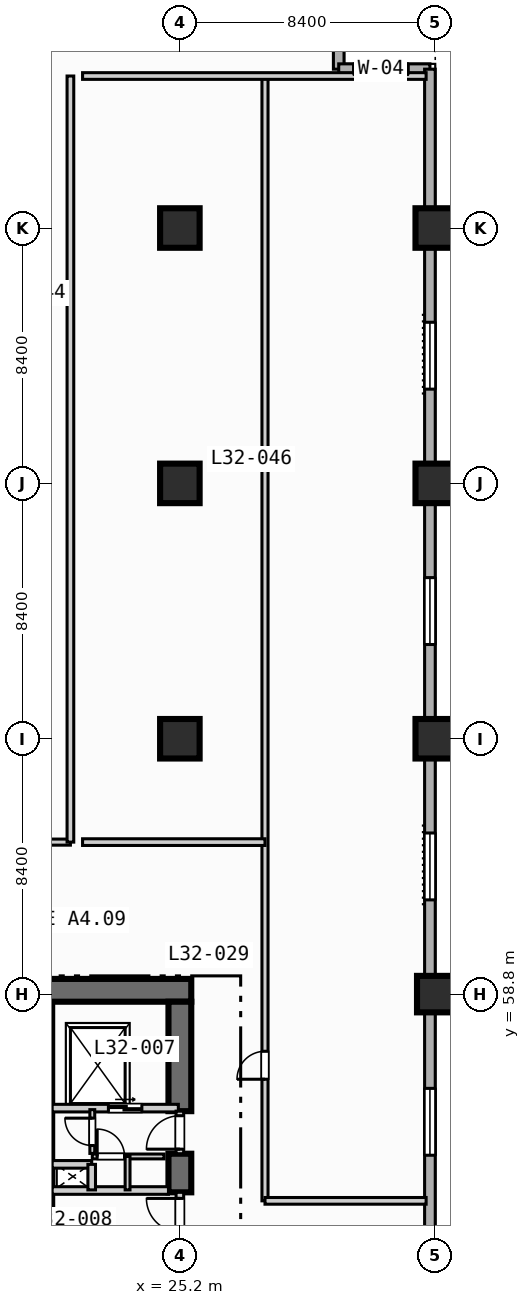
"""IFC4 building model, lengths in metres.
Left out: names, types, materials, properties, quantities, classifications, styles, units other than length and angle.
Written with IfcOpenShell. Run it as: python <this file> out.ifc"""

import sys

from ifc_helpers import new_model, si_unit, direction, frame, frame_2d, origin, origin_2d, place, context, subcontext, project, spatial, rectangle, extrude, element, fill, save


model = new_model("IFC4")
c1 = context("Model", 3, precision=1e-05, world=origin(), true_north=direction((0.0, 1.0)))
c2 = subcontext(c1, "Body", "Model", "MODEL_VIEW")
j1 = project(units=[si_unit("LENGTHUNIT", "METRE"), si_unit("PLANEANGLEUNIT", "RADIAN")], contexts=[c1])
p1 = place(None, origin())
s1 = spatial("IfcSite", under=j1, at=p1, CompositionType="ELEMENT")
p2 = place(p1, origin())
s2 = spatial("IfcBuilding", under=s1, at=p2, CompositionType="ELEMENT")
p3 = place(p2, frame((0.0, 0.0, 134.2)))
s3 = spatial("IfcBuildingStorey", under=s2, at=p3, CompositionType="ELEMENT", Elevation=134.2)
p4 = place(p3, frame((20.5, 58.925, 0.0), z_axis=(0.0, 0.0, 1.0), x_axis=(1.0, 0.0, 0.0)))
e1 = element("IfcWall", 1, at=p4, inside=s3, PredefinedType="SHEAR", context=c2, shape_type="SweptSolid", body=[
    extrude(rectangle(XDim=5.075, YDim=0.75, at=frame_2d((2.538, 0.0))), origin(), (0.0, 0.0, 1.0), 3.55),
])
p5 = place(p3, frame((25.2, 52.28, 0.0), z_axis=(0.0, 0.0, 1.0), x_axis=(0.0, 1.0, 0.0)))
e2 = element("IfcWall", 2, at=p5, inside=s3, PredefinedType="SHEAR", context=c2, shape_type="SweptSolid", body=[
    extrude(rectangle(XDim=1.27, YDim=0.75, at=frame_2d((0.635, 0.0))), origin(), (0.0, 0.0, 1.0), 3.55),
])
p6 = place(p3, frame((25.2, 54.95, 0.0), z_axis=(0.0, 0.0, 1.0), x_axis=(0.0, 1.0, 0.0)))
e3 = element("IfcWall", 3, at=p6, inside=s3, PredefinedType="SHEAR", context=c2, shape_type="SweptSolid", body=[
    extrude(rectangle(XDim=3.6, YDim=0.75, at=frame_2d((1.8, 0.0))), origin(), (0.0, 0.0, 1.0), 3.55),
])
for number, where, z_axis, x_axis in (
    (4, (25.2, 67.2, 0.0), (0.0, 0.0, 1.0), (1.0, 0.0, 0.0)),
    (5, (25.2, 75.6, 0.0), (0.0, 0.0, 1.0), (1.0, 0.0, 0.0)),
    (6, (25.2, 84.0, 0.0), (0.0, 0.0, 1.0), (1.0, 0.0, 0.0)),
):
    element("IfcColumn", number, at=place(p3, frame(where, z_axis=z_axis, x_axis=x_axis)), inside=s3, PredefinedType="COLUMN", context=c2, shape_type="SweptSolid", body=[
        extrude(rectangle(XDim=1.3, YDim=1.3, at=origin_2d()), origin(), (0.0, 0.0, 1.0), 3.8),
    ])
p7 = place(p3, frame((33.6, 58.8, 0.0), z_axis=(0.0, 0.0, 1.0), x_axis=(1.0, 0.0, 0.0)))
e7 = element("IfcColumn", 7, at=p7, inside=s3, PredefinedType="COLUMN", context=c2, shape_type="SweptSolid", body=[
    extrude(rectangle(XDim=1.2, YDim=1.2, at=origin_2d()), origin(), (0.0, 0.0, 1.0), 3.8),
])
for number, where, z_axis, x_axis in (
    (8, (33.6, 67.2, 0.0), (0.0, 0.0, 1.0), (1.0, 0.0, 0.0)),
    (9, (33.6, 75.6, 0.0), (0.0, 0.0, 1.0), (1.0, 0.0, 0.0)),
    (10, (33.6, 84.0, 0.0), (0.0, 0.0, 1.0), (1.0, 0.0, 0.0)),
):
    element("IfcColumn", number, at=place(p3, frame(where, z_axis=z_axis, x_axis=x_axis)), inside=s3, PredefinedType="COLUMN", context=c2, shape_type="SweptSolid", body=[
        extrude(rectangle(XDim=1.3, YDim=1.3, at=origin_2d()), origin(), (0.0, 0.0, 1.0), 3.8),
    ])
p8 = place(p3, frame((30.425, 92.225, 0.0), z_axis=(0.0, 0.0, 1.0), x_axis=(0.0, -1.0, 0.0)))
e11 = element("IfcWall", 11, at=p8, inside=s3, PredefinedType="STANDARD", context=c2, shape_type="SweptSolid", body=[
    extrude(rectangle(XDim=3.0, YDim=0.35, at=frame_2d((1.5, 0.0))), origin(), (0.0, 0.0, 1.0), 3.55),
])
p9 = place(p3, frame((30.425, 89.225, 0.0), z_axis=(0.0, 0.0, 1.0), x_axis=(1.0, 0.0, 0.0)))
e12 = element("IfcWall", 12, at=p9, inside=s3, PredefinedType="STANDARD", context=c2, shape_type="SweptSolid", body=[
    extrude(rectangle(XDim=3.0, YDim=0.35, at=frame_2d((1.5, 0.0))), origin(), (0.0, 0.0, 1.0), 3.55),
])
p10 = place(p9, frame((0.488, 0.0, 0.85)))
e13 = element("IfcOpeningElement", 13, at=p10, cuts=e12, PredefinedType="OPENING", context=c2, shape_type="SweptSolid", body=[
    extrude(rectangle(XDim=1.8, YDim=1.8, at=frame_2d((0.9, 0.9))), frame((0.0, 0.185, 0.0), z_axis=(0.0, -1.0, 0.0), x_axis=(1.0, 0.0, 0.0)), (0.0, 0.0, 1.0), 0.37),
])
p11 = place(p3, frame((33.425, 89.225, 0.0), z_axis=(0.0, 0.0, 1.0), x_axis=(0.0, -1.0, 0.0)))
e14 = element("IfcWall", 14, at=p11, inside=s3, PredefinedType="STANDARD", context=c2, shape_type="SweptSolid", body=[
    extrude(rectangle(XDim=55.8, YDim=0.35, at=frame_2d((27.9, 0.0))), origin(), (0.0, 0.0, 1.0), 3.55),
])
p12 = place(p11, frame((50.325, 0.0, 0.85)))
e15 = element("IfcOpeningElement", 15, at=p12, cuts=e14, PredefinedType="OPENING", context=c2, shape_type="SweptSolid", body=[
    extrude(rectangle(XDim=2.2, YDim=1.8, at=frame_2d((1.1, 0.9))), frame((0.0, 0.185, 0.0), z_axis=(0.0, -1.0, 0.0), x_axis=(1.0, 0.0, 0.0)), (0.0, 0.0, 1.0), 0.37),
])
p13 = place(p11, frame((33.525, 0.0, 0.85)))
e16 = element("IfcOpeningElement", 16, at=p13, cuts=e14, PredefinedType="OPENING", context=c2, shape_type="SweptSolid", body=[
    extrude(rectangle(XDim=2.2, YDim=1.8, at=frame_2d((1.1, 0.9))), frame((0.0, 0.185, 0.0), z_axis=(0.0, -1.0, 0.0), x_axis=(1.0, 0.0, 0.0)), (0.0, 0.0, 1.0), 0.37),
])
p14 = place(p11, frame((25.125, 0.0, 0.85)))
e17 = element("IfcOpeningElement", 17, at=p14, cuts=e14, PredefinedType="OPENING", context=c2, shape_type="SweptSolid", body=[
    extrude(rectangle(XDim=2.2, YDim=1.8, at=frame_2d((1.1, 0.9))), frame((0.0, 0.185, 0.0), z_axis=(0.0, -1.0, 0.0), x_axis=(1.0, 0.0, 0.0)), (0.0, 0.0, 1.0), 0.37),
])
p15 = place(p11, frame((16.725, 0.0, 0.85)))
e18 = element("IfcOpeningElement", 18, at=p15, cuts=e14, PredefinedType="OPENING", context=c2, shape_type="SweptSolid", body=[
    extrude(rectangle(XDim=2.2, YDim=1.8, at=frame_2d((1.1, 0.9))), frame((0.0, 0.185, 0.0), z_axis=(0.0, -1.0, 0.0), x_axis=(1.0, 0.0, 0.0)), (0.0, 0.0, 1.0), 0.37),
])
p16 = place(p11, frame((8.325, 0.0, 0.85)))
e19 = element("IfcOpeningElement", 19, at=p16, cuts=e14, PredefinedType="OPENING", context=c2, shape_type="SweptSolid", body=[
    extrude(rectangle(XDim=2.2, YDim=1.8, at=frame_2d((1.1, 0.9))), frame((0.0, 0.185, 0.0), z_axis=(0.0, -1.0, 0.0), x_axis=(1.0, 0.0, 0.0)), (0.0, 0.0, 1.0), 0.37),
])
p17 = place(p3, frame((25.2, 50.8, 0.0), z_axis=(0.0, 0.0, 1.0), x_axis=(0.0, 1.0, 0.0)))
e20 = element("IfcWall", 20, at=p17, inside=s3, PredefinedType="SOLIDWALL", context=c2, shape_type="SweptSolid", body=[
    extrude(rectangle(XDim=1.48, YDim=0.25, at=frame_2d((0.74, 0.0))), origin(), (0.0, 0.0, 1.0), 3.55),
])
p18 = place(p17, frame((0.18, 0.0, 0.0)))
e21 = element("IfcOpeningElement", 21, at=p18, cuts=e20, PredefinedType="OPENING", context=c2, shape_type="SweptSolid", body=[
    extrude(rectangle(XDim=1.1, YDim=2.15, at=frame_2d((0.55, 1.075))), frame((0.0, 0.135, 0.0), z_axis=(0.0, -1.0, 0.0), x_axis=(1.0, 0.0, 0.0)), (0.0, 0.0, 1.0), 0.27),
])
p19 = place(p3, frame((21.0, 52.34, 0.0), z_axis=(0.0, 0.0, 1.0), x_axis=(1.0, 0.0, 0.0)))
e22 = element("IfcWall", 22, at=p19, inside=s3, PredefinedType="SOLIDWALL", context=c2, shape_type="SweptSolid", body=[
    extrude(rectangle(XDim=3.825, YDim=0.25, at=frame_2d((1.913, 0.0))), origin(), (0.0, 0.0, 1.0), 3.55),
])
p20 = place(p3, frame((21.0, 55.05, 0.0), z_axis=(0.0, 0.0, 1.0), x_axis=(1.0, 0.0, 0.0)))
e23 = element("IfcWall", 23, at=p20, inside=s3, PredefinedType="SOLIDWALL", context=c2, shape_type="SweptSolid", body=[
    extrude(rectangle(XDim=4.15, YDim=0.25, at=frame_2d((2.075, 0.0))), origin(), (0.0, 0.0, 1.0), 3.55),
])
p21 = place(p20, frame((1.85, 0.0, 0.0)))
e24 = element("IfcOpeningElement", 24, at=p21, cuts=e23, PredefinedType="OPENING", context=c2, shape_type="SweptSolid", body=[
    extrude(rectangle(XDim=1.1, YDim=2.15, at=frame_2d((0.55, 1.075))), frame((0.0, 0.135, 0.0), z_axis=(0.0, -1.0, 0.0), x_axis=(1.0, 0.0, 0.0)), (0.0, 0.0, 1.0), 0.27),
])
p22 = place(p3, frame((25.2, 53.55, 0.0), z_axis=(0.0, 0.0, 1.0), x_axis=(0.0, 1.0, 0.0)))
e25 = element("IfcWall", 25, at=p22, inside=s3, PredefinedType="SOLIDWALL", context=c2, shape_type="SweptSolid", body=[
    extrude(rectangle(XDim=1.4, YDim=0.25, at=frame_2d((0.7, 0.0))), origin(), (0.0, 0.0, 1.0), 3.55),
])
p23 = place(p22, frame((0.15, 0.0, 0.0)))
e26 = element("IfcOpeningElement", 26, at=p23, cuts=e25, PredefinedType="OPENING", context=c2, shape_type="SweptSolid", body=[
    extrude(rectangle(XDim=1.1, YDim=2.15, at=frame_2d((0.55, 1.075))), frame((0.0, 0.135, 0.0), z_axis=(0.0, -1.0, 0.0), x_axis=(1.0, 0.0, 0.0)), (0.0, 0.0, 1.0), 0.27),
])
p24 = place(p3, frame((21.0, 53.2, 0.0), z_axis=(0.0, 0.0, 1.0), x_axis=(1.0, 0.0, 0.0)))
e27 = element("IfcWall", 27, at=p24, inside=s3, PredefinedType="SOLIDWALL", context=c2, shape_type="SweptSolid", body=[
    extrude(rectangle(XDim=1.3, YDim=0.25, at=frame_2d((0.65, 0.0))), origin(), (0.0, 0.0, 1.0), 3.55),
])
p25 = place(p3, frame((22.3, 52.36, 0.0), z_axis=(0.0, 0.0, 1.0), x_axis=(0.0, 1.0, 0.0)))
e28 = element("IfcWall", 28, at=p25, inside=s3, PredefinedType="SOLIDWALL", context=c2, shape_type="SweptSolid", body=[
    extrude(rectangle(XDim=0.84, YDim=0.25, at=frame_2d((0.42, 0.0))), origin(), (0.0, 0.0, 1.0), 3.55),
])
p26 = place(p3, frame((22.32, 53.56, 0.0), z_axis=(0.0, 0.0, 1.0), x_axis=(0.0, 1.0, 0.0)))
e29 = element("IfcWall", 29, at=p26, inside=s3, PredefinedType="PARTITIONING", context=c2, shape_type="SweptSolid", body=[
    extrude(rectangle(XDim=1.44, YDim=0.16, at=frame_2d((0.72, 0.0))), origin(), (0.0, 0.0, 1.0), 3.55),
])
p27 = place(p26, frame((0.26, 0.0, 0.0)))
e30 = element("IfcOpeningElement", 30, at=p27, cuts=e29, PredefinedType="OPENING", context=c2, shape_type="SweptSolid", body=[
    extrude(rectangle(XDim=0.9, YDim=2.1, at=frame_2d((0.45, 1.05))), frame((0.0, 0.09, 0.0), z_axis=(0.0, -1.0, 0.0), x_axis=(1.0, 0.0, 0.0)), (0.0, 0.0, 1.0), 0.18),
])
p28 = place(p3, frame((22.32, 53.46, 0.0), z_axis=(0.0, 0.0, 1.0), x_axis=(1.0, 0.0, 0.0)))
e31 = element("IfcWall", 31, at=p28, inside=s3, PredefinedType="PARTITIONING", context=c2, shape_type="SweptSolid", body=[
    extrude(rectangle(XDim=2.36, YDim=0.16, at=frame_2d((1.18, 0.0))), origin(), (0.0, 0.0, 1.0), 3.55),
])
p29 = place(p28, frame((0.16, 0.0, 0.0)))
e32 = element("IfcOpeningElement", 32, at=p29, cuts=e31, PredefinedType="OPENING", context=c2, shape_type="SweptSolid", body=[
    extrude(rectangle(XDim=0.9, YDim=2.1, at=frame_2d((0.45, 1.05))), frame((0.0, 0.09, 0.0), z_axis=(0.0, -1.0, 0.0), x_axis=(1.0, 0.0, 0.0)), (0.0, 0.0, 1.0), 0.18),
])
p30 = place(p3, frame((23.48, 52.36, 0.0), z_axis=(0.0, 0.0, 1.0), x_axis=(0.0, 1.0, 0.0)))
e33 = element("IfcWall", 33, at=p30, inside=s3, PredefinedType="PARTITIONING", context=c2, shape_type="SweptSolid", body=[
    extrude(rectangle(XDim=1.1, YDim=0.16, at=frame_2d((0.55, 0.0))), origin(), (0.0, 0.0, 1.0), 3.55),
])
p31 = place(p3, frame((3.4, 63.8, 0.0), z_axis=(0.0, 0.0, 1.0), x_axis=(1.0, 0.0, 0.0)))
e34 = element("IfcWall", 34, at=p31, inside=s3, PredefinedType="PARTITIONING", context=c2, shape_type="SweptSolid", body=[
    extrude(rectangle(XDim=18.2, YDim=0.2, at=frame_2d((9.1, 0.0))), origin(), (0.0, 0.0, 1.0), 3.55),
])
p32 = place(p31, frame((4.05, 0.0, 0.0)))
e35 = element("IfcOpeningElement", 35, at=p32, cuts=e34, PredefinedType="OPENING", context=c2, shape_type="SweptSolid", body=[
    extrude(rectangle(XDim=1.0, YDim=2.15, at=frame_2d((0.5, 1.075))), frame((0.0, 0.11, 0.0), z_axis=(0.0, -1.0, 0.0), x_axis=(1.0, 0.0, 0.0)), (0.0, 0.0, 1.0), 0.22),
])
p33 = place(p3, frame((21.6, 63.8, 0.0), z_axis=(0.0, 0.0, 1.0), x_axis=(0.0, 1.0, 0.0)))
e36 = element("IfcWall", 36, at=p33, inside=s3, PredefinedType="PARTITIONING", context=c2, shape_type="SweptSolid", body=[
    extrude(rectangle(XDim=25.2, YDim=0.22, at=frame_2d((12.6, 0.0))), origin(), (0.0, 0.0, 1.0), 3.55),
])
p34 = place(p3, frame((28.0, 52.0, 0.0), z_axis=(0.0, 0.0, 1.0), x_axis=(0.0, 1.0, 0.0)))
e37 = element("IfcWall", 37, at=p34, inside=s3, PredefinedType="PARTITIONING", context=c2, shape_type="SweptSolid", body=[
    extrude(rectangle(XDim=37.0, YDim=0.2, at=frame_2d((18.5, 0.0))), origin(), (0.0, 0.0, 1.0), 3.55),
])
p35 = place(p34, frame((4.0, 0.0, 0.0)))
e38 = element("IfcOpeningElement", 38, at=p35, cuts=e37, PredefinedType="OPENING", context=c2, shape_type="SweptSolid", body=[
    extrude(rectangle(XDim=0.92, YDim=2.1, at=frame_2d((0.46, 1.05))), frame((0.0, 0.11, 0.0), z_axis=(0.0, -1.0, 0.0), x_axis=(1.0, 0.0, 0.0)), (0.0, 0.0, 1.0), 0.22),
])
p36 = place(p3, frame((28.0, 52.0, 0.0), z_axis=(0.0, 0.0, 1.0), x_axis=(1.0, 0.0, 0.0)))
e39 = element("IfcWall", 39, at=p36, inside=s3, PredefinedType="PARTITIONING", context=c2, shape_type="SweptSolid", body=[
    extrude(rectangle(XDim=5.3, YDim=0.22, at=frame_2d((2.65, 0.0))), origin(), (0.0, 0.0, 1.0), 3.55),
])
p37 = place(p3, frame((22.0, 89.0, 0.0), z_axis=(0.0, 0.0, 1.0), x_axis=(1.0, 0.0, 0.0)))
e40 = element("IfcWall", 40, at=p37, inside=s3, PredefinedType="PARTITIONING", context=c2, shape_type="SweptSolid", body=[
    extrude(rectangle(XDim=11.3, YDim=0.22, at=frame_2d((5.65, 0.0))), origin(), (0.0, 0.0, 1.0), 3.55),
])
p38 = place(p3, frame((22.0, 63.8, 0.0), z_axis=(0.0, 0.0, 1.0), x_axis=(1.0, 0.0, 0.0)))
e41 = element("IfcWall", 41, at=p38, inside=s3, PredefinedType="PARTITIONING", context=c2, shape_type="SweptSolid", body=[
    extrude(rectangle(XDim=6.0, YDim=0.22, at=frame_2d((3.0, 0.0))), origin(), (0.0, 0.0, 1.0), 3.55),
])
p39 = place(p10, origin())
e42 = element("IfcWindow", 42, at=p39, inside=s3, PartitioningType="SINGLE_PANEL", PredefinedType="WINDOW", context=c2, shape_type="SweptSolid", body=[
    extrude(rectangle(XDim=1.8, YDim=1.8, at=frame_2d((0.9, 0.9))), frame((0.0, 0.03, 0.0), z_axis=(0.0, -1.0, 0.0), x_axis=(1.0, 0.0, 0.0)), (0.0, 0.0, 1.0), 0.06),
])
fill(e13, e42)
p40 = place(p13, origin())
e43 = element("IfcWindow", 43, at=p40, inside=s3, PartitioningType="SINGLE_PANEL", PredefinedType="WINDOW", context=c2, shape_type="SweptSolid", body=[
    extrude(rectangle(XDim=2.2, YDim=1.8, at=frame_2d((1.1, 0.9))), frame((0.0, 0.03, 0.0), z_axis=(0.0, -1.0, 0.0), x_axis=(1.0, 0.0, 0.0)), (0.0, 0.0, 1.0), 0.06),
])
fill(e16, e43)
p41 = place(p14, origin())
e44 = element("IfcWindow", 44, at=p41, inside=s3, PartitioningType="SINGLE_PANEL", PredefinedType="WINDOW", context=c2, shape_type="SweptSolid", body=[
    extrude(rectangle(XDim=2.2, YDim=1.8, at=frame_2d((1.1, 0.9))), frame((0.0, 0.03, 0.0), z_axis=(0.0, -1.0, 0.0), x_axis=(1.0, 0.0, 0.0)), (0.0, 0.0, 1.0), 0.06),
])
fill(e17, e44)
p42 = place(p15, origin())
e45 = element("IfcWindow", 45, at=p42, inside=s3, PartitioningType="SINGLE_PANEL", PredefinedType="WINDOW", context=c2, shape_type="SweptSolid", body=[
    extrude(rectangle(XDim=2.2, YDim=1.8, at=frame_2d((1.1, 0.9))), frame((0.0, 0.03, 0.0), z_axis=(0.0, -1.0, 0.0), x_axis=(1.0, 0.0, 0.0)), (0.0, 0.0, 1.0), 0.06),
])
fill(e18, e45)
p43 = place(p16, origin())
e46 = element("IfcWindow", 46, at=p43, inside=s3, PartitioningType="SINGLE_PANEL", PredefinedType="WINDOW", context=c2, shape_type="SweptSolid", body=[
    extrude(rectangle(XDim=2.2, YDim=1.8, at=frame_2d((1.1, 0.9))), frame((0.0, 0.03, 0.0), z_axis=(0.0, -1.0, 0.0), x_axis=(1.0, 0.0, 0.0)), (0.0, 0.0, 1.0), 0.06),
])
fill(e19, e46)
p44 = place(p18, origin())
e47 = element("IfcDoor", 47, at=p44, inside=s3, OperationType="SINGLE_SWING_RIGHT", PredefinedType="DOOR", context=c2, shape_type="SweptSolid", body=[
    extrude(rectangle(XDim=1.1, YDim=2.15, at=frame_2d((0.55, 1.075))), frame((0.0, 0.025, 0.0), z_axis=(0.0, -1.0, 0.0), x_axis=(1.0, 0.0, 0.0)), (0.0, 0.0, 1.0), 0.05),
])
fill(e21, e47)
p45 = place(p21, origin())
e48 = element("IfcDoor", 48, at=p45, inside=s3, OperationType="SLIDING_TO_LEFT", PredefinedType="DOOR", context=c2, shape_type="SweptSolid", body=[
    extrude(rectangle(XDim=1.1, YDim=2.15, at=frame_2d((0.55, 1.075))), frame((0.0, 0.025, 0.0), z_axis=(0.0, -1.0, 0.0), x_axis=(1.0, 0.0, 0.0)), (0.0, 0.0, 1.0), 0.05),
])
fill(e24, e48)
p46 = place(p23, origin())
e49 = element("IfcDoor", 49, at=p46, inside=s3, OperationType="SINGLE_SWING_LEFT", PredefinedType="DOOR", context=c2, shape_type="SweptSolid", body=[
    extrude(rectangle(XDim=1.1, YDim=2.15, at=frame_2d((0.55, 1.075))), frame((0.0, 0.025, 0.0), z_axis=(0.0, -1.0, 0.0), x_axis=(1.0, 0.0, 0.0)), (0.0, 0.0, 1.0), 0.05),
])
fill(e26, e49)
p47 = place(p27, origin())
e50 = element("IfcDoor", 50, at=p47, inside=s3, OperationType="SINGLE_SWING_RIGHT", PredefinedType="DOOR", context=c2, shape_type="SweptSolid", body=[
    extrude(rectangle(XDim=0.9, YDim=2.1, at=frame_2d((0.45, 1.05))), frame((0.0, 0.025, 0.0), z_axis=(0.0, -1.0, 0.0), x_axis=(1.0, 0.0, 0.0)), (0.0, 0.0, 1.0), 0.05),
])
fill(e30, e50)
p48 = place(p29, origin())
e51 = element("IfcDoor", 51, at=p48, inside=s3, OperationType="SINGLE_SWING_LEFT", PredefinedType="DOOR", context=c2, shape_type="SweptSolid", body=[
    extrude(rectangle(XDim=0.9, YDim=2.1, at=frame_2d((0.45, 1.05))), frame((0.0, 0.025, 0.0), z_axis=(0.0, -1.0, 0.0), x_axis=(1.0, 0.0, 0.0)), (0.0, 0.0, 1.0), 0.05),
])
fill(e32, e51)
p49 = place(p35, origin())
e52 = element("IfcDoor", 52, at=p49, inside=s3, OperationType="SINGLE_SWING_LEFT", PredefinedType="DOOR", context=c2, shape_type="SweptSolid", body=[
    extrude(rectangle(XDim=0.92, YDim=2.1, at=frame_2d((0.46, 1.05))), frame((0.0, 0.025, 0.0), z_axis=(0.0, -1.0, 0.0), x_axis=(1.0, 0.0, 0.0)), (0.0, 0.0, 1.0), 0.05),
])
fill(e38, e52)
save(model, sys.argv[1])
